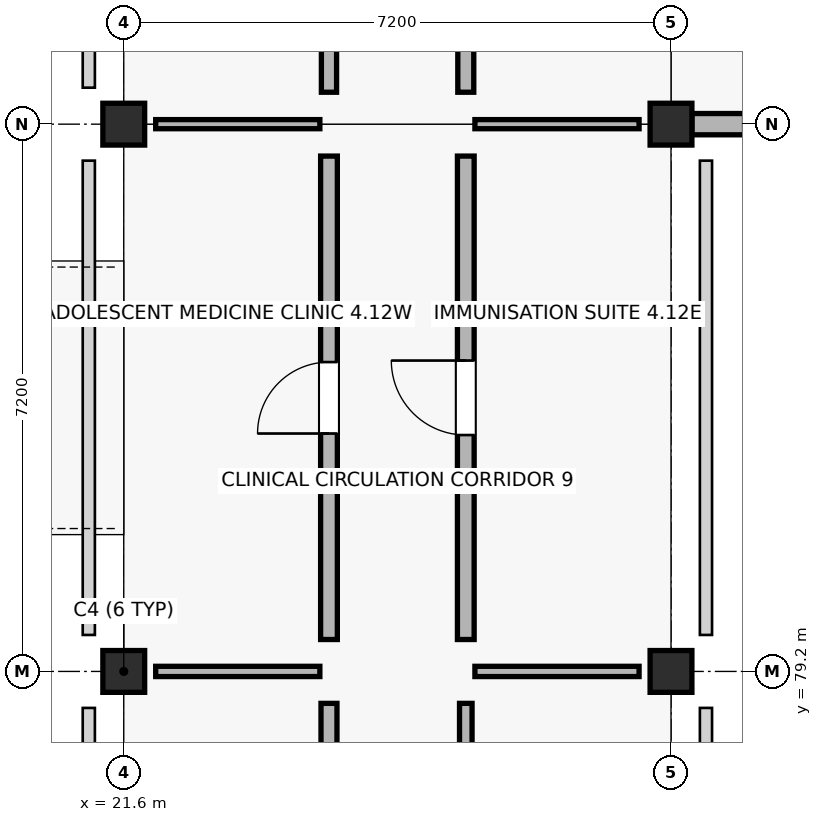
"""IFC4 building model, lengths in metres.
Left out: names, types, materials, properties, quantities, classifications, styles, units other than length and angle.
Written with IfcOpenShell. Run it as: python <this file> out.ifc"""

import sys

from ifc_helpers import new_model, si_unit, direction, frame, frame_2d, origin, origin_2d, place, context, subcontext, project, spatial, rectangle, extrude, element, fill, save


model = new_model("IFC4")
c1 = context("Model", 3, precision=1e-05, world=origin(), true_north=direction((0.0, 1.0)))
c2 = subcontext(c1, "Body", "Model", "MODEL_VIEW")
j1 = project(units=[si_unit("LENGTHUNIT", "METRE"), si_unit("PLANEANGLEUNIT", "RADIAN")], contexts=[c1])
p1 = place(None, origin())
s1 = spatial("IfcSite", under=j1, at=p1, CompositionType="ELEMENT")
p2 = place(p1, origin())
s2 = spatial("IfcBuilding", under=s1, at=p2, CompositionType="ELEMENT")
p3 = place(p2, frame((0.0, 0.0, 9.0)))
s3 = spatial("IfcBuildingStorey", under=s2, at=p3, CompositionType="ELEMENT", Elevation=9.0)
for number, where, z_axis, x_axis in (
    (1, (21.6, 79.2, 0.0), (0.0, 0.0, 1.0), (1.0, 0.0, 0.0)),
    (2, (21.6, 86.4, 0.0), (0.0, 0.0, 1.0), (1.0, 0.0, 0.0)),
    (3, (28.8, 79.2, 0.0), (0.0, 0.0, 1.0), (1.0, 0.0, 0.0)),
    (4, (28.8, 86.4, 0.0), (0.0, 0.0, 1.0), (1.0, 0.0, 0.0)),
):
    element("IfcColumn", number, at=place(p3, frame(where, z_axis=z_axis, x_axis=x_axis)), inside=s3, PredefinedType="COLUMN", context=c2, shape_type="SweptSolid", body=[
        extrude(rectangle(XDim=0.55, YDim=0.55, at=origin_2d()), origin(), (0.0, 0.0, 1.0), 4.5),
    ])
p4 = place(p3, frame((29.075, 86.4, 0.0), z_axis=(0.0, 0.0, 1.0), x_axis=(1.0, 0.0, 0.0)))
e5 = element("IfcWall", 5, at=p4, inside=s3, PredefinedType="STANDARD", context=c2, shape_type="SweptSolid", body=[
    extrude(rectangle(XDim=6.7, YDim=0.28, at=frame_2d((3.35, 0.0))), origin(), (0.0, 0.0, 1.0), 3.59),
])
p5 = place(p4, frame((0.675, 0.0, 0.9)))
e6 = element("IfcOpeningElement", 6, at=p5, cuts=e5, PredefinedType="OPENING", context=c2, shape_type="SweptSolid", body=[
    extrude(rectangle(XDim=2.15, YDim=1.25, at=frame_2d((1.075, 0.625))), frame((0.0, 0.15, 0.0), z_axis=(0.0, -1.0, 0.0), x_axis=(1.0, 0.0, 0.0)), (0.0, 0.0, 1.0), 0.3),
])
p6 = place(p4, frame((3.875, 0.0, 0.9)))
e7 = element("IfcOpeningElement", 7, at=p6, cuts=e5, PredefinedType="OPENING", context=c2, shape_type="SweptSolid", body=[
    extrude(rectangle(XDim=2.15, YDim=1.25, at=frame_2d((1.075, 0.625))), frame((0.0, 0.15, 0.0), z_axis=(0.0, -1.0, 0.0), x_axis=(1.0, 0.0, 0.0)), (0.0, 0.0, 1.0), 0.3),
])
p7 = place(p3, frame((24.3, 72.42, 0.0), z_axis=(0.0, 0.0, 1.0), x_axis=(0.0, 1.0, 0.0)))
e8 = element("IfcWall", 8, at=p7, inside=s3, PredefinedType="PLUMBINGWALL", context=c2, shape_type="SweptSolid", body=[
    extrude(rectangle(XDim=6.36, YDim=0.21, at=frame_2d((3.18, 0.0))), origin(), (0.0, 0.0, 1.0), 3.38),
])
p8 = place(p7, frame((2.43, 0.0, 0.0)))
e9 = element("IfcOpeningElement", 9, at=p8, cuts=e8, PredefinedType="OPENING", context=c2, shape_type="SweptSolid", body=[
    extrude(rectangle(XDim=1.5, YDim=2.09, at=frame_2d((0.75, 1.045))), frame((0.0, 0.115, 0.0), z_axis=(0.0, -1.0, 0.0), x_axis=(1.0, 0.0, 0.0)), (0.0, 0.0, 1.0), 0.23),
])
p9 = place(p3, frame((22.02, 79.2, 0.0), z_axis=(0.0, 0.0, 1.0), x_axis=(1.0, 0.0, 0.0)))
e10 = element("IfcWall", 10, at=p9, inside=s3, PredefinedType="PARTITIONING", context=c2, shape_type="SweptSolid", body=[
    extrude(rectangle(XDim=2.16, YDim=0.135, at=frame_2d((1.08, 0.0))), origin(), (0.0, 0.0, 1.0), 3.38),
])
p10 = place(p3, frame((26.1, 72.42, 0.0), z_axis=(0.0, 0.0, 1.0), x_axis=(0.0, 1.0, 0.0)))
e11 = element("IfcWall", 11, at=p10, inside=s3, PredefinedType="PARTITIONING", context=c2, shape_type="SweptSolid", body=[
    extrude(rectangle(XDim=6.36, YDim=0.165, at=frame_2d((3.18, 0.0))), origin(), (0.0, 0.0, 1.0), 3.38),
])
p11 = place(p10, frame((2.73, 0.0, 0.0)))
e12 = element("IfcOpeningElement", 12, at=p11, cuts=e11, PredefinedType="OPENING", context=c2, shape_type="SweptSolid", body=[
    extrude(rectangle(XDim=0.9, YDim=2.14, at=frame_2d((0.45, 1.07))), frame((0.0, 0.093, 0.0), z_axis=(0.0, -1.0, 0.0), x_axis=(1.0, 0.0, 0.0)), (0.0, 0.0, 1.0), 0.185),
])
p12 = place(p3, frame((26.22, 79.2, 0.0), z_axis=(0.0, 0.0, 1.0), x_axis=(1.0, 0.0, 0.0)))
e13 = element("IfcWall", 13, at=p12, inside=s3, PredefinedType="PARTITIONING", context=c2, shape_type="SweptSolid", body=[
    extrude(rectangle(XDim=2.16, YDim=0.135, at=frame_2d((1.08, 0.0))), origin(), (0.0, 0.0, 1.0), 3.38),
])
p13 = place(p3, frame((24.3, 79.62, 0.0), z_axis=(0.0, 0.0, 1.0), x_axis=(0.0, 1.0, 0.0)))
e14 = element("IfcWall", 14, at=p13, inside=s3, PredefinedType="SOLIDWALL", context=c2, shape_type="SweptSolid", body=[
    extrude(rectangle(XDim=6.36, YDim=0.22, at=frame_2d((3.18, 0.0))), origin(), (0.0, 0.0, 1.0), 3.38),
])
p14 = place(p13, frame((2.71, 0.0, 0.0)))
e15 = element("IfcOpeningElement", 15, at=p14, cuts=e14, PredefinedType="OPENING", context=c2, shape_type="SweptSolid", body=[
    extrude(rectangle(XDim=0.94, YDim=2.14, at=frame_2d((0.47, 1.07))), frame((0.0, 0.12, 0.0), z_axis=(0.0, -1.0, 0.0), x_axis=(1.0, 0.0, 0.0)), (0.0, 0.0, 1.0), 0.24),
])
p15 = place(p3, frame((22.02, 86.4, 0.0), z_axis=(0.0, 0.0, 1.0), x_axis=(1.0, 0.0, 0.0)))
e16 = element("IfcWall", 16, at=p15, inside=s3, PredefinedType="PARTITIONING", context=c2, shape_type="SweptSolid", body=[
    extrude(rectangle(XDim=2.16, YDim=0.12, at=frame_2d((1.08, 0.0))), origin(), (0.0, 0.0, 1.0), 3.38),
])
p16 = place(p3, frame((26.1, 79.62, 0.0), z_axis=(0.0, 0.0, 1.0), x_axis=(0.0, 1.0, 0.0)))
e17 = element("IfcWall", 17, at=p16, inside=s3, PredefinedType="SOLIDWALL", context=c2, shape_type="SweptSolid", body=[
    extrude(rectangle(XDim=6.36, YDim=0.22, at=frame_2d((3.18, 0.0))), origin(), (0.0, 0.0, 1.0), 3.38),
])
p17 = place(p16, frame((2.69, 0.0, 0.0)))
e18 = element("IfcOpeningElement", 18, at=p17, cuts=e17, PredefinedType="OPENING", context=c2, shape_type="SweptSolid", body=[
    extrude(rectangle(XDim=0.98, YDim=2.14, at=frame_2d((0.49, 1.07))), frame((0.0, 0.12, 0.0), z_axis=(0.0, -1.0, 0.0), x_axis=(1.0, 0.0, 0.0)), (0.0, 0.0, 1.0), 0.24),
])
p18 = place(p3, frame((26.22, 86.4, 0.0), z_axis=(0.0, 0.0, 1.0), x_axis=(1.0, 0.0, 0.0)))
e19 = element("IfcWall", 19, at=p18, inside=s3, PredefinedType="PARTITIONING", context=c2, shape_type="SweptSolid", body=[
    extrude(rectangle(XDim=2.16, YDim=0.12, at=frame_2d((1.08, 0.0))), origin(), (0.0, 0.0, 1.0), 3.38),
])
p19 = place(p3, frame((24.3, 86.82, 0.0), z_axis=(0.0, 0.0, 1.0), x_axis=(0.0, 1.0, 0.0)))
e20 = element("IfcWall", 20, at=p19, inside=s3, PredefinedType="SOLIDWALL", context=c2, shape_type="SweptSolid", body=[
    extrude(rectangle(XDim=6.36, YDim=0.2, at=frame_2d((3.18, 0.0))), origin(), (0.0, 0.0, 1.0), 3.38),
])
p20 = place(p19, frame((2.67, 0.0, 0.0)))
e21 = element("IfcOpeningElement", 21, at=p20, cuts=e20, PredefinedType="OPENING", context=c2, shape_type="SweptSolid", body=[
    extrude(rectangle(XDim=1.02, YDim=2.14, at=frame_2d((0.51, 1.07))), frame((0.0, 0.11, 0.0), z_axis=(0.0, -1.0, 0.0), x_axis=(1.0, 0.0, 0.0)), (0.0, 0.0, 1.0), 0.22),
])
p21 = place(p3, frame((26.1, 86.82, 0.0), z_axis=(0.0, 0.0, 1.0), x_axis=(0.0, 1.0, 0.0)))
e22 = element("IfcWall", 22, at=p21, inside=s3, PredefinedType="PLUMBINGWALL", context=c2, shape_type="SweptSolid", body=[
    extrude(rectangle(XDim=6.36, YDim=0.21, at=frame_2d((3.18, 0.0))), origin(), (0.0, 0.0, 1.0), 3.38),
])
p22 = place(p21, frame((2.65, 0.0, 0.0)))
e23 = element("IfcOpeningElement", 23, at=p22, cuts=e22, PredefinedType="OPENING", context=c2, shape_type="SweptSolid", body=[
    extrude(rectangle(XDim=1.06, YDim=2.14, at=frame_2d((0.53, 1.07))), frame((0.0, 0.115, 0.0), z_axis=(0.0, -1.0, 0.0), x_axis=(1.0, 0.0, 0.0)), (0.0, 0.0, 1.0), 0.23),
])
p23 = place(p14, origin())
e24 = element("IfcDoor", 24, at=p23, inside=s3, OperationType="SINGLE_SWING_LEFT", PredefinedType="DOOR", context=c2, shape_type="SweptSolid", body=[
    extrude(rectangle(XDim=0.94, YDim=2.14, at=frame_2d((0.47, 1.07))), frame((0.0, 0.025, 0.0), z_axis=(0.0, -1.0, 0.0), x_axis=(1.0, 0.0, 0.0)), (0.0, 0.0, 1.0), 0.05),
])
fill(e15, e24)
p24 = place(p17, origin())
e25 = element("IfcDoor", 25, at=p24, inside=s3, OperationType="SINGLE_SWING_RIGHT", PredefinedType="DOOR", context=c2, shape_type="SweptSolid", body=[
    extrude(rectangle(XDim=0.98, YDim=2.14, at=frame_2d((0.49, 1.07))), frame((0.0, 0.025, 0.0), z_axis=(0.0, -1.0, 0.0), x_axis=(1.0, 0.0, 0.0)), (0.0, 0.0, 1.0), 0.05),
])
fill(e18, e25)
save(model, sys.argv[1])
